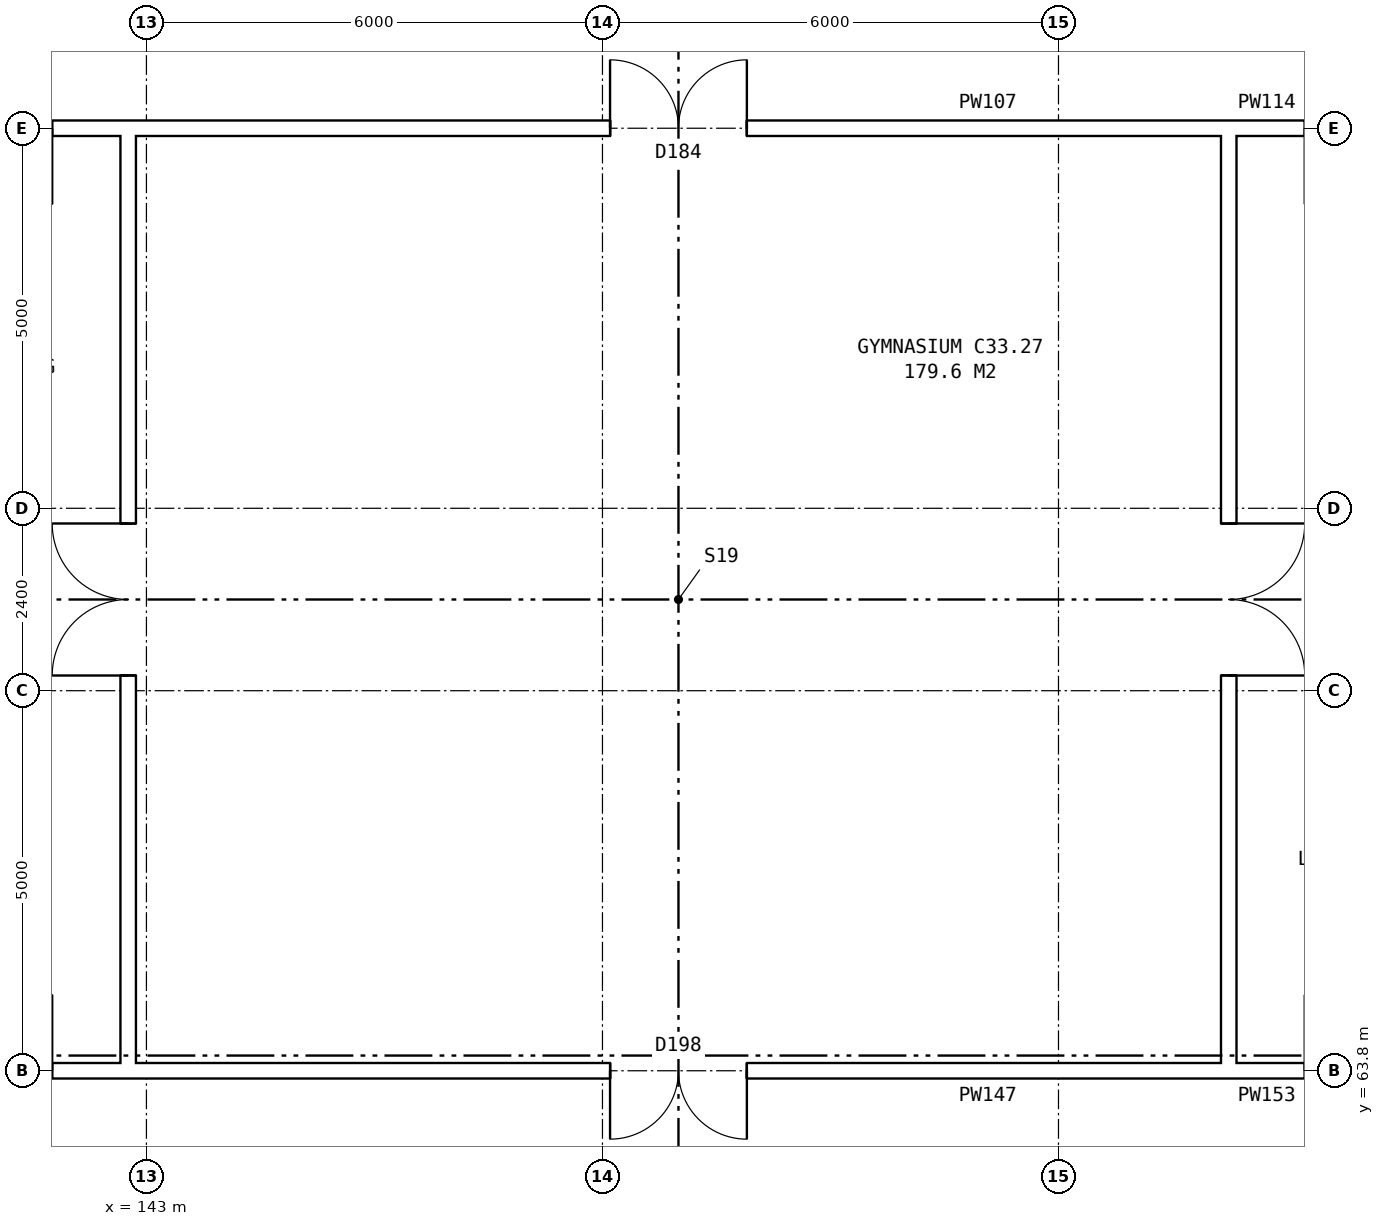
"""IFC4 building model, lengths in metres.
Left out: names, types, materials, properties, quantities, classifications, styles, units other than length and angle.
Written with IfcOpenShell. Run it as: python <this file> out.ifc"""

import sys

from ifc_helpers import new_model, si_unit, direction, frame, frame_2d, origin, place, context, subcontext, project, spatial, rectangle, extrude, element, fill, save


model = new_model("IFC4")
c1 = context("Model", 3, precision=1e-05, world=origin(), true_north=direction((0.0, 1.0)))
c2 = subcontext(c1, "Body", "Model", "MODEL_VIEW")
j1 = project(units=[si_unit("LENGTHUNIT", "METRE"), si_unit("PLANEANGLEUNIT", "RADIAN")], contexts=[c1])
p1 = place(None, origin())
s1 = spatial("IfcSite", under=j1, at=p1, CompositionType="ELEMENT")
p2 = place(p1, origin())
s2 = spatial("IfcBuilding", under=s1, at=p2, CompositionType="ELEMENT")
p3 = place(p2, frame((0.0, 0.0, 119.5)))
s3 = spatial("IfcBuildingStorey", under=s2, at=p3, CompositionType="ELEMENT", Elevation=119.5)
p4 = place(p3, frame((142.76, 63.9, 0.0), z_axis=(0.0, 0.0, 1.0), x_axis=(0.0, 1.0, 0.0)))
e1 = element("IfcWall", 1, at=p4, inside=s3, PredefinedType="PARTITIONING", context=c2, shape_type="SweptSolid", body=[
    extrude(rectangle(XDim=12.2, YDim=0.2, at=frame_2d((6.1, 0.0))), origin(), (0.0, 0.0, 1.0), 3.6),
])
p5 = place(p4, frame((5.1, 0.0, 0.0)))
e2 = element("IfcOpeningElement", 2, at=p5, cuts=e1, PredefinedType="OPENING", context=c2, shape_type="SweptSolid", body=[
    extrude(rectangle(XDim=2.0, YDim=2.1, at=frame_2d((1.0, 1.05))), frame((0.0, 0.11, 0.0), z_axis=(0.0, -1.0, 0.0), x_axis=(1.0, 0.0, 0.0)), (0.0, 0.0, 1.0), 0.22),
])
p6 = place(p3, frame((157.24, 63.9, 0.0), z_axis=(0.0, 0.0, 1.0), x_axis=(0.0, 1.0, 0.0)))
e3 = element("IfcWall", 3, at=p6, inside=s3, PredefinedType="PARTITIONING", context=c2, shape_type="SweptSolid", body=[
    extrude(rectangle(XDim=12.2, YDim=0.2, at=frame_2d((6.1, 0.0))), origin(), (0.0, 0.0, 1.0), 3.6),
])
p7 = place(p6, frame((5.1, 0.0, 0.0)))
e4 = element("IfcOpeningElement", 4, at=p7, cuts=e3, PredefinedType="OPENING", context=c2, shape_type="SweptSolid", body=[
    extrude(rectangle(XDim=2.0, YDim=2.1, at=frame_2d((1.0, 1.05))), frame((0.0, 0.11, 0.0), z_axis=(0.0, -1.0, 0.0), x_axis=(1.0, 0.0, 0.0)), (0.0, 0.0, 1.0), 0.22),
])
p8 = place(p3, frame((142.76, 63.8, 0.0), z_axis=(0.0, 0.0, 1.0), x_axis=(1.0, 0.0, 0.0)))
e5 = element("IfcWall", 5, at=p8, inside=s3, PredefinedType="PARTITIONING", context=c2, shape_type="SweptSolid", body=[
    extrude(rectangle(XDim=14.48, YDim=0.2, at=frame_2d((7.24, 0.0))), origin(), (0.0, 0.0, 1.0), 3.6),
])
p9 = place(p8, frame((6.34, 0.0, 0.0)))
e6 = element("IfcOpeningElement", 6, at=p9, cuts=e5, PredefinedType="OPENING", context=c2, shape_type="SweptSolid", body=[
    extrude(rectangle(XDim=1.8, YDim=2.1, at=frame_2d((0.9, 1.05))), frame((0.0, 0.11, 0.0), z_axis=(0.0, -1.0, 0.0), x_axis=(1.0, 0.0, 0.0)), (0.0, 0.0, 1.0), 0.22),
])
p10 = place(p3, frame((139.76, 63.8, 0.0), z_axis=(0.0, 0.0, 1.0), x_axis=(1.0, 0.0, 0.0)))
e7 = element("IfcWall", 7, at=p10, inside=s3, PredefinedType="PARTITIONING", context=c2, shape_type="SweptSolid", body=[
    extrude(rectangle(XDim=3.0, YDim=0.2, at=frame_2d((1.5, 0.0))), origin(), (0.0, 0.0, 1.0), 3.6),
])
p11 = place(p10, frame((1.0, 0.0, 0.0)))
e8 = element("IfcOpeningElement", 8, at=p11, cuts=e7, PredefinedType="OPENING", context=c2, shape_type="SweptSolid", body=[
    extrude(rectangle(XDim=1.0, YDim=2.1, at=frame_2d((0.5, 1.05))), frame((0.0, 0.11, 0.0), z_axis=(0.0, -1.0, 0.0), x_axis=(1.0, 0.0, 0.0)), (0.0, 0.0, 1.0), 0.22),
])
p12 = place(p3, frame((157.24, 63.8, 0.0), z_axis=(0.0, 0.0, 1.0), x_axis=(1.0, 0.0, 0.0)))
e9 = element("IfcWall", 9, at=p12, inside=s3, PredefinedType="PARTITIONING", context=c2, shape_type="SweptSolid", body=[
    extrude(rectangle(XDim=3.0, YDim=0.2, at=frame_2d((1.5, 0.0))), origin(), (0.0, 0.0, 1.0), 3.6),
])
p13 = place(p12, frame((1.0, 0.0, 0.0)))
e10 = element("IfcOpeningElement", 10, at=p13, cuts=e9, PredefinedType="OPENING", context=c2, shape_type="SweptSolid", body=[
    extrude(rectangle(XDim=1.0, YDim=2.1, at=frame_2d((0.5, 1.05))), frame((0.0, 0.11, 0.0), z_axis=(0.0, -1.0, 0.0), x_axis=(1.0, 0.0, 0.0)), (0.0, 0.0, 1.0), 0.22),
])
p14 = place(p3, frame((142.76, 76.2, 0.0), z_axis=(0.0, 0.0, 1.0), x_axis=(1.0, 0.0, 0.0)))
e11 = element("IfcWall", 11, at=p14, inside=s3, PredefinedType="PARTITIONING", context=c2, shape_type="SweptSolid", body=[
    extrude(rectangle(XDim=14.48, YDim=0.2, at=frame_2d((7.24, 0.0))), origin(), (0.0, 0.0, 1.0), 3.6),
])
p15 = place(p14, frame((6.34, 0.0, 0.0)))
e12 = element("IfcOpeningElement", 12, at=p15, cuts=e11, PredefinedType="OPENING", context=c2, shape_type="SweptSolid", body=[
    extrude(rectangle(XDim=1.8, YDim=2.1, at=frame_2d((0.9, 1.05))), frame((0.0, 0.11, 0.0), z_axis=(0.0, -1.0, 0.0), x_axis=(1.0, 0.0, 0.0)), (0.0, 0.0, 1.0), 0.22),
])
p16 = place(p3, frame((139.76, 76.2, 0.0), z_axis=(0.0, 0.0, 1.0), x_axis=(1.0, 0.0, 0.0)))
e13 = element("IfcWall", 13, at=p16, inside=s3, PredefinedType="PARTITIONING", context=c2, shape_type="SweptSolid", body=[
    extrude(rectangle(XDim=3.0, YDim=0.2, at=frame_2d((1.5, 0.0))), origin(), (0.0, 0.0, 1.0), 3.6),
])
p17 = place(p16, frame((1.0, 0.0, 0.0)))
e14 = element("IfcOpeningElement", 14, at=p17, cuts=e13, PredefinedType="OPENING", context=c2, shape_type="SweptSolid", body=[
    extrude(rectangle(XDim=1.0, YDim=2.1, at=frame_2d((0.5, 1.05))), frame((0.0, 0.11, 0.0), z_axis=(0.0, -1.0, 0.0), x_axis=(1.0, 0.0, 0.0)), (0.0, 0.0, 1.0), 0.22),
])
p18 = place(p3, frame((157.24, 76.2, 0.0), z_axis=(0.0, 0.0, 1.0), x_axis=(1.0, 0.0, 0.0)))
e15 = element("IfcWall", 15, at=p18, inside=s3, PredefinedType="PARTITIONING", context=c2, shape_type="SweptSolid", body=[
    extrude(rectangle(XDim=3.0, YDim=0.2, at=frame_2d((1.5, 0.0))), origin(), (0.0, 0.0, 1.0), 3.6),
])
p19 = place(p18, frame((1.0, 0.0, 0.0)))
e16 = element("IfcOpeningElement", 16, at=p19, cuts=e15, PredefinedType="OPENING", context=c2, shape_type="SweptSolid", body=[
    extrude(rectangle(XDim=1.0, YDim=2.1, at=frame_2d((0.5, 1.05))), frame((0.0, 0.11, 0.0), z_axis=(0.0, -1.0, 0.0), x_axis=(1.0, 0.0, 0.0)), (0.0, 0.0, 1.0), 0.22),
])
p20 = place(p5, origin())
e17 = element("IfcDoor", 17, at=p20, inside=s3, OperationType="DOUBLE_DOOR_SINGLE_SWING", PredefinedType="DOOR", context=c2, shape_type="SweptSolid", body=[
    extrude(rectangle(XDim=2.0, YDim=2.1, at=frame_2d((1.0, 1.05))), frame((0.0, 0.025, 0.0), z_axis=(0.0, -1.0, 0.0), x_axis=(1.0, 0.0, 0.0)), (0.0, 0.0, 1.0), 0.05),
])
fill(e2, e17)
p21 = place(p7, frame((2.0, 0.0, 0.0), z_axis=(0.0, 0.0, 1.0), x_axis=(-1.0, 0.0, 0.0)))
e18 = element("IfcDoor", 18, at=p21, inside=s3, OperationType="DOUBLE_DOOR_SINGLE_SWING", PredefinedType="DOOR", context=c2, shape_type="SweptSolid", body=[
    extrude(rectangle(XDim=2.0, YDim=2.1, at=frame_2d((1.0, 1.05))), frame((0.0, 0.025, 0.0), z_axis=(0.0, -1.0, 0.0), x_axis=(1.0, 0.0, 0.0)), (0.0, 0.0, 1.0), 0.05),
])
fill(e4, e18)
p22 = place(p9, frame((1.8, 0.0, 0.0), z_axis=(0.0, 0.0, 1.0), x_axis=(-1.0, 0.0, 0.0)))
e19 = element("IfcDoor", 19, at=p22, inside=s3, OperationType="DOUBLE_DOOR_SINGLE_SWING", PredefinedType="DOOR", context=c2, shape_type="SweptSolid", body=[
    extrude(rectangle(XDim=1.8, YDim=2.1, at=frame_2d((0.9, 1.05))), frame((0.0, 0.025, 0.0), z_axis=(0.0, -1.0, 0.0), x_axis=(1.0, 0.0, 0.0)), (0.0, 0.0, 1.0), 0.05),
])
fill(e6, e19)
p23 = place(p15, origin())
e20 = element("IfcDoor", 20, at=p23, inside=s3, OperationType="DOUBLE_DOOR_SINGLE_SWING", PredefinedType="DOOR", context=c2, shape_type="SweptSolid", body=[
    extrude(rectangle(XDim=1.8, YDim=2.1, at=frame_2d((0.9, 1.05))), frame((0.0, 0.025, 0.0), z_axis=(0.0, -1.0, 0.0), x_axis=(1.0, 0.0, 0.0)), (0.0, 0.0, 1.0), 0.05),
])
fill(e12, e20)
save(model, sys.argv[1])
